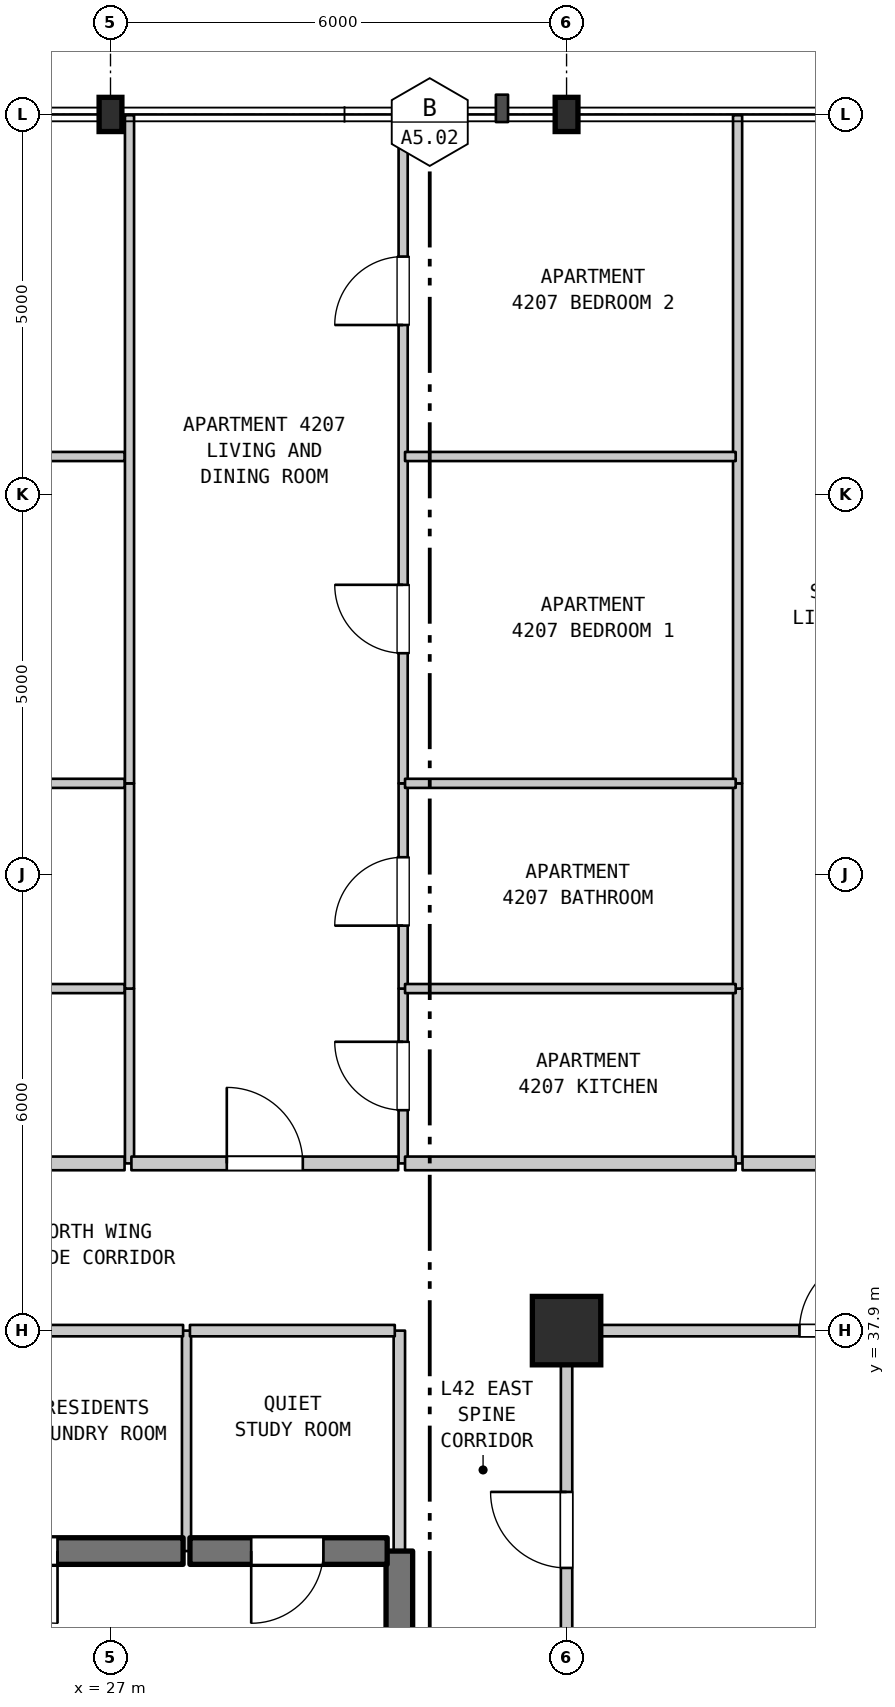
"""IFC4 building model, lengths in metres.
Left out: names, types, materials, properties, quantities, classifications, styles, units other than length and angle.
Written with IfcOpenShell. Run it as: python <this file> out.ifc"""

import sys

from ifc_helpers import new_model, si_unit, direction, frame, frame_2d, origin, origin_2d, place, context, subcontext, project, spatial, rectangle, i_section, extrude, element, fill, save


model = new_model("IFC4")
c1 = context("Model", 3, precision=1e-05, world=origin(), true_north=direction((0.0, 1.0)))
c2 = subcontext(c1, "Body", "Model", "MODEL_VIEW")
j1 = project(units=[si_unit("LENGTHUNIT", "METRE"), si_unit("PLANEANGLEUNIT", "RADIAN")], contexts=[c1])
p1 = place(None, origin())
s1 = spatial("IfcSite", under=j1, at=p1, CompositionType="ELEMENT")
p2 = place(p1, origin())
s2 = spatial("IfcBuilding", under=s1, at=p2, CompositionType="ELEMENT")
p3 = place(p2, frame((0.0, 0.0, 172.8)))
s3 = spatial("IfcBuildingStorey", under=s2, at=p3, CompositionType="ELEMENT", Elevation=172.8)
p4 = place(p3, frame((27.0, 53.9, 0.0), z_axis=(0.0, 0.0, 1.0), x_axis=(1.0, 0.0, 0.0)))
e1 = element("IfcColumn", 1, at=p4, inside=s3, PredefinedType="COLUMN", context=c2, shape_type="SweptSolid", body=[
    extrude(i_section(OverallWidth=0.3, OverallDepth=0.45, WebThickness=0.014, FlangeThickness=0.026, FilletRadius=0.027, at=origin_2d()), origin(), (0.0, 0.0, 1.0), 3.7),
])
p5 = place(p3, frame((33.0, 37.9, 0.0), z_axis=(0.0, 0.0, 1.0), x_axis=(1.0, 0.0, 0.0)))
e2 = element("IfcColumn", 2, at=p5, inside=s3, PredefinedType="COLUMN", context=c2, shape_type="SweptSolid", body=[
    extrude(rectangle(XDim=0.9, YDim=0.9, at=origin_2d()), origin(), (0.0, 0.0, 1.0), 3.7),
])
p6 = place(p3, frame((33.0, 53.9, 0.0), z_axis=(0.0, 0.0, 1.0), x_axis=(1.0, 0.0, 0.0)))
e3 = element("IfcColumn", 3, at=p6, inside=s3, PredefinedType="COLUMN", context=c2, shape_type="SweptSolid", body=[
    extrude(i_section(OverallWidth=0.3, OverallDepth=0.45, WebThickness=0.014, FlangeThickness=0.026, FilletRadius=0.027, at=origin_2d()), origin(), (0.0, 0.0, 1.0), 3.7),
])
p7 = place(p3, frame((27.25, 40.1, 0.0), z_axis=(0.0, 0.0, 1.0), x_axis=(0.0, 1.0, 0.0)))
e4 = element("IfcWall", 4, at=p7, inside=s3, PredefinedType="PARTITIONING", context=c2, shape_type="SweptSolid", body=[
    extrude(rectangle(XDim=2.3, YDim=0.12, at=frame_2d((1.15, 0.0))), origin(), (0.0, 0.0, 1.0), 3.39),
])
p8 = place(p3, frame((27.25, 42.4, 0.0), z_axis=(0.0, 0.0, 1.0), x_axis=(0.0, 1.0, 0.0)))
e5 = element("IfcWall", 5, at=p8, inside=s3, PredefinedType="PARTITIONING", context=c2, shape_type="SweptSolid", body=[
    extrude(rectangle(XDim=2.7, YDim=0.12, at=frame_2d((1.35, 0.0))), origin(), (0.0, 0.0, 1.0), 3.39),
])
p9 = place(p3, frame((27.25, 45.1, 0.0), z_axis=(0.0, 0.0, 1.0), x_axis=(0.0, 1.0, 0.0)))
e6 = element("IfcWall", 6, at=p9, inside=s3, PredefinedType="PARTITIONING", context=c2, shape_type="SweptSolid", body=[
    extrude(rectangle(XDim=8.79, YDim=0.12, at=frame_2d((4.395, 0.0))), origin(), (0.0, 0.0, 1.0), 3.39),
])
p10 = place(p3, frame((28.0, 35.0, 0.0), z_axis=(0.0, 0.0, 1.0), x_axis=(0.0, 1.0, 0.0)))
e7 = element("IfcWall", 7, at=p10, inside=s3, PredefinedType="PARTITIONING", context=c2, shape_type="SweptSolid", body=[
    extrude(rectangle(XDim=2.9, YDim=0.12, at=frame_2d((1.45, 0.0))), origin(), (0.0, 0.0, 1.0), 3.39),
])
p11 = place(p3, frame((30.8, 31.5, 0.0), z_axis=(0.0, 0.0, 1.0), x_axis=(0.0, 1.0, 0.0)))
e8 = element("IfcWall", 8, at=p11, inside=s3, PredefinedType="SHEAR", context=c2, shape_type="SweptSolid", body=[
    extrude(rectangle(XDim=3.5, YDim=0.35, at=frame_2d((1.75, 0.0))), origin(), (0.0, 0.0, 1.0), 3.39),
])
p12 = place(p11, frame((1.15, 0.0, 0.0)))
e9 = element("IfcOpeningElement", 9, at=p12, cuts=e8, PredefinedType="OPENING", context=c2, shape_type="SweptSolid", body=[
    extrude(rectangle(XDim=1.2, YDim=2.2, at=frame_2d((0.6, 1.1))), frame((0.0, 0.185, 0.0), z_axis=(0.0, -1.0, 0.0), x_axis=(1.0, 0.0, 0.0)), (0.0, 0.0, 1.0), 0.37),
])
p13 = place(p3, frame((30.8, 35.0, 0.0), z_axis=(0.0, 0.0, 1.0), x_axis=(0.0, 1.0, 0.0)))
e10 = element("IfcWall", 10, at=p13, inside=s3, PredefinedType="STANDARD", context=c2, shape_type="SweptSolid", body=[
    extrude(rectangle(XDim=2.9, YDim=0.15, at=frame_2d((1.45, 0.0))), origin(), (0.0, 0.0, 1.0), 3.39),
])
p14 = place(p3, frame((30.85, 40.1, 0.0), z_axis=(0.0, 0.0, 1.0), x_axis=(0.0, 1.0, 0.0)))
e11 = element("IfcWall", 11, at=p14, inside=s3, PredefinedType="PARTITIONING", context=c2, shape_type="SweptSolid", body=[
    extrude(rectangle(XDim=2.3, YDim=0.12, at=frame_2d((1.15, 0.0))), origin(), (0.0, 0.0, 1.0), 3.39),
])
p15 = place(p14, frame((0.7, 0.0, 0.0)))
e12 = element("IfcOpeningElement", 12, at=p15, cuts=e11, PredefinedType="OPENING", context=c2, shape_type="SweptSolid", body=[
    extrude(rectangle(XDim=0.9, YDim=2.15, at=frame_2d((0.45, 1.075))), frame((0.0, 0.07, 0.0), z_axis=(0.0, -1.0, 0.0), x_axis=(1.0, 0.0, 0.0)), (0.0, 0.0, 1.0), 0.14),
])
p16 = place(p3, frame((30.85, 42.4, 0.0), z_axis=(0.0, 0.0, 1.0), x_axis=(0.0, 1.0, 0.0)))
e13 = element("IfcWall", 13, at=p16, inside=s3, PredefinedType="PARTITIONING", context=c2, shape_type="SweptSolid", body=[
    extrude(rectangle(XDim=2.7, YDim=0.12, at=frame_2d((1.35, 0.0))), origin(), (0.0, 0.0, 1.0), 3.39),
])
p17 = place(p16, frame((0.828, 0.0, 0.0)))
e14 = element("IfcOpeningElement", 14, at=p17, cuts=e13, PredefinedType="OPENING", context=c2, shape_type="SweptSolid", body=[
    extrude(rectangle(XDim=0.9, YDim=2.1, at=frame_2d((0.45, 1.05))), frame((0.0, 0.07, 0.0), z_axis=(0.0, -1.0, 0.0), x_axis=(1.0, 0.0, 0.0)), (0.0, 0.0, 1.0), 0.14),
])
p18 = place(p3, frame((30.85, 45.1, 0.0), z_axis=(0.0, 0.0, 1.0), x_axis=(0.0, 1.0, 0.0)))
e15 = element("IfcWall", 15, at=p18, inside=s3, PredefinedType="PARTITIONING", context=c2, shape_type="SweptSolid", body=[
    extrude(rectangle(XDim=8.79, YDim=0.12, at=frame_2d((4.395, 0.0))), origin(), (0.0, 0.0, 1.0), 3.39),
])
p19 = place(p18, frame((1.712, 0.0, 0.0)))
e16 = element("IfcOpeningElement", 16, at=p19, cuts=e15, PredefinedType="OPENING", context=c2, shape_type="SweptSolid", body=[
    extrude(rectangle(XDim=0.9, YDim=2.15, at=frame_2d((0.45, 1.075))), frame((0.0, 0.07, 0.0), z_axis=(0.0, -1.0, 0.0), x_axis=(1.0, 0.0, 0.0)), (0.0, 0.0, 1.0), 0.14),
])
p20 = place(p18, frame((6.03, 0.0, 0.0)))
e17 = element("IfcOpeningElement", 17, at=p20, cuts=e15, PredefinedType="OPENING", context=c2, shape_type="SweptSolid", body=[
    extrude(rectangle(XDim=0.9, YDim=2.15, at=frame_2d((0.45, 1.075))), frame((0.0, 0.07, 0.0), z_axis=(0.0, -1.0, 0.0), x_axis=(1.0, 0.0, 0.0)), (0.0, 0.0, 1.0), 0.14),
])
p21 = place(p3, frame((33.0, 32.8, 0.0), z_axis=(0.0, 0.0, 1.0), x_axis=(0.0, 1.0, 0.0)))
e18 = element("IfcWall", 18, at=p21, inside=s3, PredefinedType="STANDARD", context=c2, shape_type="SweptSolid", body=[
    extrude(rectangle(XDim=5.1, YDim=0.15, at=frame_2d((2.55, 0.0))), origin(), (0.0, 0.0, 1.0), 2.89),
])
p22 = place(p21, frame((1.978, 0.0, 0.0)))
e19 = element("IfcOpeningElement", 19, at=p22, cuts=e18, PredefinedType="OPENING", context=c2, shape_type="SweptSolid", body=[
    extrude(rectangle(XDim=1.0, YDim=2.15, at=frame_2d((0.5, 1.075))), frame((0.0, 0.085, 0.0), z_axis=(0.0, -1.0, 0.0), x_axis=(1.0, 0.0, 0.0)), (0.0, 0.0, 1.0), 0.17),
])
p23 = place(p3, frame((35.25, 40.1, 0.0), z_axis=(0.0, 0.0, 1.0), x_axis=(0.0, 1.0, 0.0)))
e20 = element("IfcWall", 20, at=p23, inside=s3, PredefinedType="PARTITIONING", context=c2, shape_type="SweptSolid", body=[
    extrude(rectangle(XDim=2.3, YDim=0.12, at=frame_2d((1.15, 0.0))), origin(), (0.0, 0.0, 1.0), 3.39),
])
p24 = place(p3, frame((35.25, 42.4, 0.0), z_axis=(0.0, 0.0, 1.0), x_axis=(0.0, 1.0, 0.0)))
e21 = element("IfcWall", 21, at=p24, inside=s3, PredefinedType="PARTITIONING", context=c2, shape_type="SweptSolid", body=[
    extrude(rectangle(XDim=2.7, YDim=0.12, at=frame_2d((1.35, 0.0))), origin(), (0.0, 0.0, 1.0), 3.39),
])
p25 = place(p3, frame((35.25, 45.1, 0.0), z_axis=(0.0, 0.0, 1.0), x_axis=(0.0, 1.0, 0.0)))
e22 = element("IfcWall", 22, at=p25, inside=s3, PredefinedType="PARTITIONING", context=c2, shape_type="SweptSolid", body=[
    extrude(rectangle(XDim=8.79, YDim=0.12, at=frame_2d((4.395, 0.0))), origin(), (0.0, 0.0, 1.0), 3.39),
])
p26 = place(p3, frame((23.96, 35.0, 0.0), z_axis=(0.0, 0.0, 1.0), x_axis=(1.0, 0.0, 0.0)))
e23 = element("IfcWall", 23, at=p26, inside=s3, PredefinedType="SHEAR", context=c2, shape_type="SweptSolid", body=[
    extrude(rectangle(XDim=3.995, YDim=0.35, at=frame_2d((1.998, 0.0))), origin(), (0.0, 0.0, 1.0), 3.39),
])
p27 = place(p26, frame((1.393, 0.0, 0.0)))
e24 = element("IfcOpeningElement", 24, at=p27, cuts=e23, PredefinedType="OPENING", context=c2, shape_type="SweptSolid", body=[
    extrude(rectangle(XDim=0.95, YDim=2.15, at=frame_2d((0.475, 1.075))), frame((0.0, 0.185, 0.0), z_axis=(0.0, -1.0, 0.0), x_axis=(1.0, 0.0, 0.0)), (0.0, 0.0, 1.0), 0.37),
])
p28 = place(p3, frame((28.045, 35.0, 0.0), z_axis=(0.0, 0.0, 1.0), x_axis=(1.0, 0.0, 0.0)))
e25 = element("IfcWall", 25, at=p28, inside=s3, PredefinedType="SHEAR", context=c2, shape_type="SweptSolid", body=[
    extrude(rectangle(XDim=2.595, YDim=0.35, at=frame_2d((1.297, 0.0))), origin(), (0.0, 0.0, 1.0), 3.39),
])
p29 = place(p28, frame((0.806, 0.0, 0.0)))
e26 = element("IfcOpeningElement", 26, at=p29, cuts=e25, PredefinedType="OPENING", context=c2, shape_type="SweptSolid", body=[
    extrude(rectangle(XDim=0.95, YDim=2.15, at=frame_2d((0.475, 1.075))), frame((0.0, 0.185, 0.0), z_axis=(0.0, -1.0, 0.0), x_axis=(1.0, 0.0, 0.0)), (0.0, 0.0, 1.0), 0.37),
])
p30 = place(p3, frame((23.96, 37.9, 0.0), z_axis=(0.0, 0.0, 1.0), x_axis=(1.0, 0.0, 0.0)))
e27 = element("IfcWall", 27, at=p30, inside=s3, PredefinedType="STANDARD", context=c2, shape_type="SweptSolid", body=[
    extrude(rectangle(XDim=3.995, YDim=0.15, at=frame_2d((1.998, 0.0))), origin(), (0.0, 0.0, 1.0), 2.89),
])
p31 = place(p3, frame((28.045, 37.9, 0.0), z_axis=(0.0, 0.0, 1.0), x_axis=(1.0, 0.0, 0.0)))
e28 = element("IfcWall", 28, at=p31, inside=s3, PredefinedType="STANDARD", context=c2, shape_type="SweptSolid", body=[
    extrude(rectangle(XDim=2.695, YDim=0.15, at=frame_2d((1.348, 0.0))), origin(), (0.0, 0.0, 1.0), 2.89),
])
p32 = place(p3, frame((33.06, 37.9, 0.0), z_axis=(0.0, 0.0, 1.0), x_axis=(1.0, 0.0, 0.0)))
e29 = element("IfcWall", 29, at=p32, inside=s3, PredefinedType="STANDARD", context=c2, shape_type="SweptSolid", body=[
    extrude(rectangle(XDim=7.164, YDim=0.15, at=frame_2d((3.582, 0.0))), origin(), (0.0, 0.0, 1.0), 3.39),
])
p33 = place(p32, frame((3.004, 0.0, 0.0)))
e30 = element("IfcOpeningElement", 30, at=p33, cuts=e29, PredefinedType="OPENING", context=c2, shape_type="SweptSolid", body=[
    extrude(rectangle(XDim=1.0, YDim=2.15, at=frame_2d((0.5, 1.075))), frame((0.0, 0.085, 0.0), z_axis=(0.0, -1.0, 0.0), x_axis=(1.0, 0.0, 0.0)), (0.0, 0.0, 1.0), 0.17),
])
p34 = place(p3, frame((22.195, 40.1, 0.0), z_axis=(0.0, 0.0, 1.0), x_axis=(1.0, 0.0, 0.0)))
e31 = element("IfcWall", 31, at=p34, inside=s3, PredefinedType="STANDARD", context=c2, shape_type="SweptSolid", body=[
    extrude(rectangle(XDim=4.99, YDim=0.18, at=frame_2d((2.495, 0.0))), origin(), (0.0, 0.0, 1.0), 3.39),
])
p35 = place(p3, frame((27.275, 40.1, 0.0), z_axis=(0.0, 0.0, 1.0), x_axis=(1.0, 0.0, 0.0)))
e32 = element("IfcWall", 32, at=p35, inside=s3, PredefinedType="STANDARD", context=c2, shape_type="SweptSolid", body=[
    extrude(rectangle(XDim=3.51, YDim=0.18, at=frame_2d((1.755, 0.0))), origin(), (0.0, 0.0, 1.0), 3.39),
])
p36 = place(p35, frame((1.255, 0.0, 0.0)))
e33 = element("IfcOpeningElement", 33, at=p36, cuts=e32, PredefinedType="OPENING", context=c2, shape_type="SweptSolid", body=[
    extrude(rectangle(XDim=1.0, YDim=2.15, at=frame_2d((0.5, 1.075))), frame((0.0, 0.1, 0.0), z_axis=(0.0, -1.0, 0.0), x_axis=(1.0, 0.0, 0.0)), (0.0, 0.0, 1.0), 0.2),
])
p37 = place(p3, frame((30.875, 40.1, 0.0), z_axis=(0.0, 0.0, 1.0), x_axis=(1.0, 0.0, 0.0)))
e34 = element("IfcWall", 34, at=p37, inside=s3, PredefinedType="STANDARD", context=c2, shape_type="SweptSolid", body=[
    extrude(rectangle(XDim=4.35, YDim=0.18, at=frame_2d((2.175, 0.0))), origin(), (0.0, 0.0, 1.0), 3.39),
])
p38 = place(p3, frame((35.315, 40.1, 0.0), z_axis=(0.0, 0.0, 1.0), x_axis=(1.0, 0.0, 0.0)))
e35 = element("IfcWall", 35, at=p38, inside=s3, PredefinedType="STANDARD", context=c2, shape_type="SweptSolid", body=[
    extrude(rectangle(XDim=3.51, YDim=0.18, at=frame_2d((1.755, 0.0))), origin(), (0.0, 0.0, 1.0), 3.39),
])
p39 = place(p38, frame((1.255, 0.0, 0.0)))
e36 = element("IfcOpeningElement", 36, at=p39, cuts=e35, PredefinedType="OPENING", context=c2, shape_type="SweptSolid", body=[
    extrude(rectangle(XDim=1.0, YDim=2.15, at=frame_2d((0.5, 1.075))), frame((0.0, 0.1, 0.0), z_axis=(0.0, -1.0, 0.0), x_axis=(1.0, 0.0, 0.0)), (0.0, 0.0, 1.0), 0.2),
])
p40 = place(p3, frame((22.195, 42.4, 0.0), z_axis=(0.0, 0.0, 1.0), x_axis=(1.0, 0.0, 0.0)))
e37 = element("IfcWall", 37, at=p40, inside=s3, PredefinedType="PARTITIONING", context=c2, shape_type="SweptSolid", body=[
    extrude(rectangle(XDim=4.99, YDim=0.12, at=frame_2d((2.495, 0.0))), origin(), (0.0, 0.0, 1.0), 3.39),
])
p41 = place(p3, frame((30.875, 42.4, 0.0), z_axis=(0.0, 0.0, 1.0), x_axis=(1.0, 0.0, 0.0)))
e38 = element("IfcWall", 38, at=p41, inside=s3, PredefinedType="PARTITIONING", context=c2, shape_type="SweptSolid", body=[
    extrude(rectangle(XDim=4.35, YDim=0.12, at=frame_2d((2.175, 0.0))), origin(), (0.0, 0.0, 1.0), 3.39),
])
p42 = place(p3, frame((22.195, 45.1, 0.0), z_axis=(0.0, 0.0, 1.0), x_axis=(1.0, 0.0, 0.0)))
e39 = element("IfcWall", 39, at=p42, inside=s3, PredefinedType="PARTITIONING", context=c2, shape_type="SweptSolid", body=[
    extrude(rectangle(XDim=4.99, YDim=0.12, at=frame_2d((2.495, 0.0))), origin(), (0.0, 0.0, 1.0), 3.39),
])
p43 = place(p3, frame((30.875, 45.1, 0.0), z_axis=(0.0, 0.0, 1.0), x_axis=(1.0, 0.0, 0.0)))
e40 = element("IfcWall", 40, at=p43, inside=s3, PredefinedType="PARTITIONING", context=c2, shape_type="SweptSolid", body=[
    extrude(rectangle(XDim=4.35, YDim=0.12, at=frame_2d((2.175, 0.0))), origin(), (0.0, 0.0, 1.0), 3.39),
])
p44 = place(p3, frame((22.195, 49.4, 0.0), z_axis=(0.0, 0.0, 1.0), x_axis=(1.0, 0.0, 0.0)))
e41 = element("IfcWall", 41, at=p44, inside=s3, PredefinedType="PARTITIONING", context=c2, shape_type="SweptSolid", body=[
    extrude(rectangle(XDim=4.99, YDim=0.12, at=frame_2d((2.495, 0.0))), origin(), (0.0, 0.0, 1.0), 3.39),
])
p45 = place(p3, frame((30.875, 49.4, 0.0), z_axis=(0.0, 0.0, 1.0), x_axis=(1.0, 0.0, 0.0)))
e42 = element("IfcWall", 42, at=p45, inside=s3, PredefinedType="PARTITIONING", context=c2, shape_type="SweptSolid", body=[
    extrude(rectangle(XDim=4.35, YDim=0.12, at=frame_2d((2.175, 0.0))), origin(), (0.0, 0.0, 1.0), 3.39),
])
p46 = place(p15, origin())
e43 = element("IfcDoor", 43, at=p46, inside=s3, OperationType="SINGLE_SWING_RIGHT", PredefinedType="DOOR", context=c2, shape_type="SweptSolid", body=[
    extrude(rectangle(XDim=0.9, YDim=2.15, at=frame_2d((0.45, 1.075))), frame((0.0, 0.025, 0.0), z_axis=(0.0, -1.0, 0.0), x_axis=(1.0, 0.0, 0.0)), (0.0, 0.0, 1.0), 0.05),
])
fill(e12, e43)
p47 = place(p17, origin())
e44 = element("IfcDoor", 44, at=p47, inside=s3, OperationType="SINGLE_SWING_LEFT", PredefinedType="DOOR", context=c2, shape_type="SweptSolid", body=[
    extrude(rectangle(XDim=0.9, YDim=2.1, at=frame_2d((0.45, 1.05))), frame((0.0, 0.025, 0.0), z_axis=(0.0, -1.0, 0.0), x_axis=(1.0, 0.0, 0.0)), (0.0, 0.0, 1.0), 0.05),
])
fill(e14, e44)
p48 = place(p19, origin())
e45 = element("IfcDoor", 45, at=p48, inside=s3, OperationType="SINGLE_SWING_RIGHT", PredefinedType="DOOR", context=c2, shape_type="SweptSolid", body=[
    extrude(rectangle(XDim=0.9, YDim=2.15, at=frame_2d((0.45, 1.075))), frame((0.0, 0.025, 0.0), z_axis=(0.0, -1.0, 0.0), x_axis=(1.0, 0.0, 0.0)), (0.0, 0.0, 1.0), 0.05),
])
fill(e16, e45)
p49 = place(p20, origin())
e46 = element("IfcDoor", 46, at=p49, inside=s3, OperationType="SINGLE_SWING_LEFT", PredefinedType="DOOR", context=c2, shape_type="SweptSolid", body=[
    extrude(rectangle(XDim=0.9, YDim=2.15, at=frame_2d((0.45, 1.075))), frame((0.0, 0.025, 0.0), z_axis=(0.0, -1.0, 0.0), x_axis=(1.0, 0.0, 0.0)), (0.0, 0.0, 1.0), 0.05),
])
fill(e17, e46)
p50 = place(p22, origin())
e47 = element("IfcDoor", 47, at=p50, inside=s3, OperationType="SINGLE_SWING_RIGHT", PredefinedType="DOOR", context=c2, shape_type="SweptSolid", body=[
    extrude(rectangle(XDim=1.0, YDim=2.15, at=frame_2d((0.5, 1.075))), frame((0.0, 0.025, 0.0), z_axis=(0.0, -1.0, 0.0), x_axis=(1.0, 0.0, 0.0)), (0.0, 0.0, 1.0), 0.05),
])
fill(e19, e47)
p51 = place(p27, frame((0.95, 0.0, 0.0), z_axis=(0.0, 0.0, 1.0), x_axis=(-1.0, 0.0, 0.0)))
e48 = element("IfcDoor", 48, at=p51, inside=s3, OperationType="SINGLE_SWING_RIGHT", PredefinedType="DOOR", context=c2, shape_type="SweptSolid", body=[
    extrude(rectangle(XDim=0.95, YDim=2.15, at=frame_2d((0.475, 1.075))), frame((0.0, 0.025, 0.0), z_axis=(0.0, -1.0, 0.0), x_axis=(1.0, 0.0, 0.0)), (0.0, 0.0, 1.0), 0.05),
])
fill(e24, e48)
p52 = place(p29, frame((0.95, 0.0, 0.0), z_axis=(0.0, 0.0, 1.0), x_axis=(-1.0, 0.0, 0.0)))
e49 = element("IfcDoor", 49, at=p52, inside=s3, OperationType="SINGLE_SWING_LEFT", PredefinedType="DOOR", context=c2, shape_type="SweptSolid", body=[
    extrude(rectangle(XDim=0.95, YDim=2.15, at=frame_2d((0.475, 1.075))), frame((0.0, 0.025, 0.0), z_axis=(0.0, -1.0, 0.0), x_axis=(1.0, 0.0, 0.0)), (0.0, 0.0, 1.0), 0.05),
])
fill(e26, e49)
p53 = place(p33, origin())
e50 = element("IfcDoor", 50, at=p53, inside=s3, OperationType="SINGLE_SWING_RIGHT", PredefinedType="DOOR", context=c2, shape_type="SweptSolid", body=[
    extrude(rectangle(XDim=1.0, YDim=2.15, at=frame_2d((0.5, 1.075))), frame((0.0, 0.025, 0.0), z_axis=(0.0, -1.0, 0.0), x_axis=(1.0, 0.0, 0.0)), (0.0, 0.0, 1.0), 0.05),
])
fill(e30, e50)
p54 = place(p36, origin())
e51 = element("IfcDoor", 51, at=p54, inside=s3, OperationType="SINGLE_SWING_LEFT", PredefinedType="DOOR", context=c2, shape_type="SweptSolid", body=[
    extrude(rectangle(XDim=1.0, YDim=2.15, at=frame_2d((0.5, 1.075))), frame((0.0, 0.025, 0.0), z_axis=(0.0, -1.0, 0.0), x_axis=(1.0, 0.0, 0.0)), (0.0, 0.0, 1.0), 0.05),
])
fill(e33, e51)
save(model, sys.argv[1])
